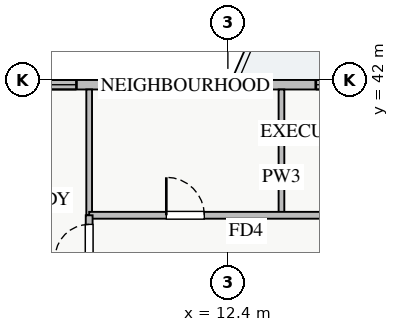
"""IFC4 building model, lengths in metres.
Left out: names, types, materials, properties, quantities, classifications, styles, units other than length and angle.
Written with IfcOpenShell. Run it as: python <this file> out.ifc"""

import sys

from ifc_helpers import new_model, si_unit, direction, frame, frame_2d, origin, place, context, subcontext, project, spatial, rectangle, extrude, source, transform, mapped, element, fill, save


model = new_model("IFC4")
c1 = context("Model", 3, precision=1e-05, world=origin(), true_north=direction((0.0, 1.0)))
c2 = subcontext(c1, "Body", "Model", "MODEL_VIEW")
j1 = project(units=[si_unit("LENGTHUNIT", "METRE"), si_unit("PLANEANGLEUNIT", "RADIAN")], contexts=[c1])
p1 = place(None, origin())
s1 = spatial("IfcSite", under=j1, at=p1, CompositionType="ELEMENT")
p2 = place(p1, origin())
s2 = spatial("IfcBuilding", under=s1, at=p2, CompositionType="ELEMENT")
p3 = place(p2, frame((0.0, 0.0, 63.25)))
s3 = spatial("IfcBuildingStorey", under=s2, at=p3, CompositionType="ELEMENT", Elevation=63.25)
p4 = place(p3, frame((5.45, 41.875, 0.0), z_axis=(0.0, 0.0, 1.0), x_axis=(1.0, 0.0, 0.0)))
e1 = element("IfcWall", 1, at=p4, inside=s3, PredefinedType="STANDARD", context=c2, shape_type="SweptSolid", body=[
    extrude(rectangle(XDim=27.1, YDim=0.25, at=frame_2d((13.55, 0.0))), origin(), (0.0, 0.0, 1.0), 2.61),
])
p5 = place(p4, frame((14.4, 0.0, 0.0)))
e2 = element("IfcOpeningElement", 2, at=p5, cuts=e1, PredefinedType="OPENING", context=c2, shape_type="SweptSolid", body=[
    extrude(rectangle(XDim=1.2, YDim=2.1, at=frame_2d((0.6, 1.05))), frame((0.0, 0.135, 0.0), z_axis=(0.0, -1.0, 0.0), x_axis=(1.0, 0.0, 0.0)), (0.0, 0.0, 1.0), 0.27),
])
p6 = place(p4, frame((1.465, 0.0, 0.9)))
e3 = element("IfcOpeningElement", 3, at=p6, cuts=e1, PredefinedType="OPENING", context=c2, shape_type="SweptSolid", body=[
    extrude(rectangle(XDim=1.5, YDim=1.5, at=frame_2d((0.75, 0.75))), frame((0.0, 0.135, 0.0), z_axis=(0.0, -1.0, 0.0), x_axis=(1.0, 0.0, 0.0)), (0.0, 0.0, 1.0), 0.27),
])
p7 = place(p4, frame((9.263, 0.0, 0.9)))
e4 = element("IfcOpeningElement", 4, at=p7, cuts=e1, PredefinedType="OPENING", context=c2, shape_type="SweptSolid", body=[
    extrude(rectangle(XDim=1.8, YDim=1.45, at=frame_2d((0.9, 0.725))), frame((0.0, 0.135, 0.0), z_axis=(0.0, -1.0, 0.0), x_axis=(1.0, 0.0, 0.0)), (0.0, 0.0, 1.0), 0.27),
])
p8 = place(p4, frame((17.93, 0.0, 0.9)))
e5 = element("IfcOpeningElement", 5, at=p8, cuts=e1, PredefinedType="OPENING", context=c2, shape_type="SweptSolid", body=[
    extrude(rectangle(XDim=1.5, YDim=1.5, at=frame_2d((0.75, 0.75))), frame((0.0, 0.135, 0.0), z_axis=(0.0, -1.0, 0.0), x_axis=(1.0, 0.0, 0.0)), (0.0, 0.0, 1.0), 0.27),
])
p9 = place(p4, frame((22.663, 0.0, 0.9)))
e6 = element("IfcOpeningElement", 6, at=p9, cuts=e1, PredefinedType="OPENING", context=c2, shape_type="SweptSolid", body=[
    extrude(rectangle(XDim=2.1, YDim=1.48, at=frame_2d((1.05, 0.74))), frame((0.0, 0.135, 0.0), z_axis=(0.0, -1.0, 0.0), x_axis=(1.0, 0.0, 0.0)), (0.0, 0.0, 1.0), 0.27),
])
p10 = place(p4, frame((4.63, 0.0, 0.9)))
e7 = element("IfcOpeningElement", 7, at=p10, cuts=e1, PredefinedType="OPENING", context=c2, shape_type="SweptSolid", body=[
    extrude(rectangle(XDim=2.4, YDim=1.5, at=frame_2d((1.2, 0.75))), frame((0.0, 0.135, 0.0), z_axis=(0.0, -1.0, 0.0), x_axis=(1.0, 0.0, 0.0)), (0.0, 0.0, 1.0), 0.27),
])
for number, where, z_axis, x_axis in (
    (8, (13.81, 38.44, 0.0), (0.0, 0.0, 1.0), (0.0, 1.0, 0.0)),
    (9, (8.75, 38.44, 0.0), (0.0, 0.0, 1.0), (0.0, 1.0, 0.0)),
):
    element("IfcWall", number, at=place(p3, frame(where, z_axis=z_axis, x_axis=x_axis)), inside=s3, PredefinedType="PARTITIONING", context=c2, shape_type="SweptSolid", body=[
        extrude(rectangle(XDim=3.31, YDim=0.15, at=frame_2d((1.655, 0.0))), origin(), (0.0, 0.0, 1.0), 3.07),
    ])
p11 = place(p3, frame((8.75, 38.44, 0.0), z_axis=(0.0, 0.0, 1.0), x_axis=(1.0, 0.0, 0.0)))
e10 = element("IfcWall", 10, at=p11, inside=s3, PredefinedType="PARTITIONING", context=c2, shape_type="SweptSolid", body=[
    extrude(rectangle(XDim=23.61, YDim=0.18, at=frame_2d((11.805, 0.0))), origin(), (0.0, 0.0, 1.0), 3.07),
])
p12 = place(p11, frame((2.03, 0.0, 0.0)))
e11 = element("IfcOpeningElement", 11, at=p12, cuts=e10, PredefinedType="OPENING", context=c2, shape_type="SweptSolid", body=[
    extrude(rectangle(XDim=1.0, YDim=2.05, at=frame_2d((0.5, 1.025))), frame((0.0, 0.1, 0.0), z_axis=(0.0, -1.0, 0.0), x_axis=(1.0, 0.0, 0.0)), (0.0, 0.0, 1.0), 0.2),
])
p13 = place(p11, frame((8.555, 0.0, 0.0)))
e12 = element("IfcOpeningElement", 12, at=p13, cuts=e10, PredefinedType="OPENING", context=c2, shape_type="SweptSolid", body=[
    extrude(rectangle(XDim=1.0, YDim=2.05, at=frame_2d((0.5, 1.025))), frame((0.0, 0.1, 0.0), z_axis=(0.0, -1.0, 0.0), x_axis=(1.0, 0.0, 0.0)), (0.0, 0.0, 1.0), 0.2),
])
p14 = place(p11, frame((14.88, 0.0, 0.0)))
e13 = element("IfcOpeningElement", 13, at=p14, cuts=e10, PredefinedType="OPENING", context=c2, shape_type="SweptSolid", body=[
    extrude(rectangle(XDim=1.0, YDim=2.05, at=frame_2d((0.5, 1.025))), frame((0.0, 0.1, 0.0), z_axis=(0.0, -1.0, 0.0), x_axis=(1.0, 0.0, 0.0)), (0.0, 0.0, 1.0), 0.2),
])
p15 = place(p11, frame((20.16, 0.0, 0.0)))
e14 = element("IfcOpeningElement", 14, at=p15, cuts=e10, PredefinedType="OPENING", context=c2, shape_type="SweptSolid", body=[
    extrude(rectangle(XDim=1.0, YDim=2.05, at=frame_2d((0.5, 1.025))), frame((0.0, 0.1, 0.0), z_axis=(0.0, -1.0, 0.0), x_axis=(1.0, 0.0, 0.0)), (0.0, 0.0, 1.0), 0.2),
])
p16 = place(p3, frame((8.75, 7.21, 0.0), z_axis=(0.0, 0.0, 1.0), x_axis=(0.0, 1.0, 0.0)))
e15 = element("IfcWall", 15, at=p16, inside=s3, PredefinedType="PARTITIONING", context=c2, shape_type="SweptSolid", body=[
    extrude(rectangle(XDim=31.23, YDim=0.18, at=frame_2d((15.615, 0.0))), origin(), (0.0, 0.0, 1.0), 3.07),
])
p17 = place(p16, frame((30.09, 0.0, 0.0)))
e16 = element("IfcOpeningElement", 16, at=p17, cuts=e15, PredefinedType="OPENING", context=c2, shape_type="SweptSolid", body=[
    extrude(rectangle(XDim=0.9, YDim=2.05, at=frame_2d((0.45, 1.025))), frame((0.0, 0.1, 0.0), z_axis=(0.0, -1.0, 0.0), x_axis=(1.0, 0.0, 0.0)), (0.0, 0.0, 1.0), 0.2),
])
p18 = place(p16, frame((0.24, 0.0, 0.0)))
e17 = element("IfcOpeningElement", 17, at=p18, cuts=e15, PredefinedType="OPENING", context=c2, shape_type="SweptSolid", body=[
    extrude(rectangle(XDim=0.9, YDim=2.05, at=frame_2d((0.45, 1.025))), frame((0.0, 0.1, 0.0), z_axis=(0.0, -1.0, 0.0), x_axis=(1.0, 0.0, 0.0)), (0.0, 0.0, 1.0), 0.2),
])
p19 = place(p16, frame((2.555, 0.0, 0.0)))
e18 = element("IfcOpeningElement", 18, at=p19, cuts=e15, PredefinedType="OPENING", context=c2, shape_type="SweptSolid", body=[
    extrude(rectangle(XDim=1.0, YDim=2.05, at=frame_2d((0.5, 1.025))), frame((0.0, 0.1, 0.0), z_axis=(0.0, -1.0, 0.0), x_axis=(1.0, 0.0, 0.0)), (0.0, 0.0, 1.0), 0.2),
])
p20 = place(p16, frame((11.91, 0.0, 0.0)))
e19 = element("IfcOpeningElement", 19, at=p20, cuts=e15, PredefinedType="OPENING", context=c2, shape_type="SweptSolid", body=[
    extrude(rectangle(XDim=1.0, YDim=2.05, at=frame_2d((0.5, 1.025))), frame((0.0, 0.1, 0.0), z_axis=(0.0, -1.0, 0.0), x_axis=(1.0, 0.0, 0.0)), (0.0, 0.0, 1.0), 0.2),
])
p21 = place(p16, frame((17.425, 0.0, 0.0)))
e20 = element("IfcOpeningElement", 20, at=p21, cuts=e15, PredefinedType="OPENING", context=c2, shape_type="SweptSolid", body=[
    extrude(rectangle(XDim=1.0, YDim=2.05, at=frame_2d((0.5, 1.025))), frame((0.0, 0.1, 0.0), z_axis=(0.0, -1.0, 0.0), x_axis=(1.0, 0.0, 0.0)), (0.0, 0.0, 1.0), 0.2),
])
p22 = place(p16, frame((23.76, 0.0, 0.0)))
e21 = element("IfcOpeningElement", 21, at=p22, cuts=e15, PredefinedType="OPENING", context=c2, shape_type="SweptSolid", body=[
    extrude(rectangle(XDim=1.0, YDim=2.05, at=frame_2d((0.5, 1.025))), frame((0.0, 0.1, 0.0), z_axis=(0.0, -1.0, 0.0), x_axis=(1.0, 0.0, 0.0)), (0.0, 0.0, 1.0), 0.2),
])
m1 = source(origin(), c2, "Body", "SweptSolid", [
    extrude(rectangle(XDim=1.5, YDim=1.5, at=frame_2d((0.75, 0.75))), frame((0.0, 0.03, 0.0), z_axis=(0.0, -1.0, 0.0), x_axis=(1.0, 0.0, 0.0)), (0.0, 0.0, 1.0), 0.06),
])
p23 = place(p6, origin())
e22 = element("IfcWindow", 22, at=p23, inside=s3, PartitioningType="TRIPLE_PANEL_VERTICAL", PredefinedType="WINDOW", context=c2, shape_type="MappedRepresentation", body=[
    mapped(m1, transform((0.0, 0.0, 0.0), x_axis=(1.0, 0.0, 0.0), y_axis=(0.0, 1.0, 0.0), z_axis=(0.0, 0.0, 1.0), scale=1.0)),
])
fill(e3, e22)
m2 = source(origin(), c2, "Body", "SweptSolid", [
    extrude(rectangle(XDim=1.8, YDim=1.45, at=frame_2d((0.9, 0.725))), frame((0.0, 0.03, 0.0), z_axis=(0.0, -1.0, 0.0), x_axis=(1.0, 0.0, 0.0)), (0.0, 0.0, 1.0), 0.06),
])
p24 = place(p7, origin())
e23 = element("IfcWindow", 23, at=p24, inside=s3, PartitioningType="DOUBLE_PANEL_VERTICAL", PredefinedType="WINDOW", context=c2, shape_type="MappedRepresentation", body=[
    mapped(m2, transform((0.0, 0.0, 0.0), x_axis=(1.0, 0.0, 0.0), y_axis=(0.0, 1.0, 0.0), z_axis=(0.0, 0.0, 1.0), scale=1.0)),
])
fill(e4, e23)
m3 = source(origin(), c2, "Body", "SweptSolid", [
    extrude(rectangle(XDim=1.0, YDim=2.05, at=frame_2d((0.5, 1.025))), frame((0.0, 0.025, 0.0), z_axis=(0.0, -1.0, 0.0), x_axis=(1.0, 0.0, 0.0)), (0.0, 0.0, 1.0), 0.05),
])
p25 = place(p12, origin())
e24 = element("IfcDoor", 24, at=p25, inside=s3, OperationType="SINGLE_SWING_LEFT", PredefinedType="DOOR", context=c2, shape_type="MappedRepresentation", body=[
    mapped(m3, transform((0.0, 0.0, 0.0), x_axis=(1.0, 0.0, 0.0), y_axis=(0.0, 1.0, 0.0), z_axis=(0.0, 0.0, 1.0), scale=1.0)),
])
fill(e11, e24)
m4 = source(origin(), c2, "Body", "SweptSolid", [
    extrude(rectangle(XDim=0.9, YDim=2.05, at=frame_2d((0.45, 1.025))), frame((0.0, 0.025, 0.0), z_axis=(0.0, -1.0, 0.0), x_axis=(1.0, 0.0, 0.0)), (0.0, 0.0, 1.0), 0.05),
])
p26 = place(p17, origin())
e25 = element("IfcDoor", 25, at=p26, inside=s3, OperationType="SINGLE_SWING_LEFT", PredefinedType="DOOR", context=c2, shape_type="MappedRepresentation", body=[
    mapped(m4, transform((0.0, 0.0, 0.0), x_axis=(1.0, 0.0, 0.0), y_axis=(0.0, 1.0, 0.0), z_axis=(0.0, 0.0, 1.0), scale=1.0)),
])
fill(e16, e25)
m5 = source(origin(), c2, "Body", "SweptSolid", [
    extrude(rectangle(XDim=2.4, YDim=1.5, at=frame_2d((1.2, 0.75))), frame((0.0, 0.03, 0.0), z_axis=(0.0, -1.0, 0.0), x_axis=(1.0, 0.0, 0.0)), (0.0, 0.0, 1.0), 0.06),
])
p27 = place(p10, origin())
e26 = element("IfcWindow", 26, at=p27, inside=s3, PartitioningType="TRIPLE_PANEL_VERTICAL", PredefinedType="WINDOW", context=c2, shape_type="MappedRepresentation", body=[
    mapped(m5, transform((0.0, 0.0, 0.0), x_axis=(1.0, 0.0, 0.0), y_axis=(0.0, 1.0, 0.0), z_axis=(0.0, 0.0, 1.0), scale=1.0)),
])
fill(e7, e26)
save(model, sys.argv[1])
